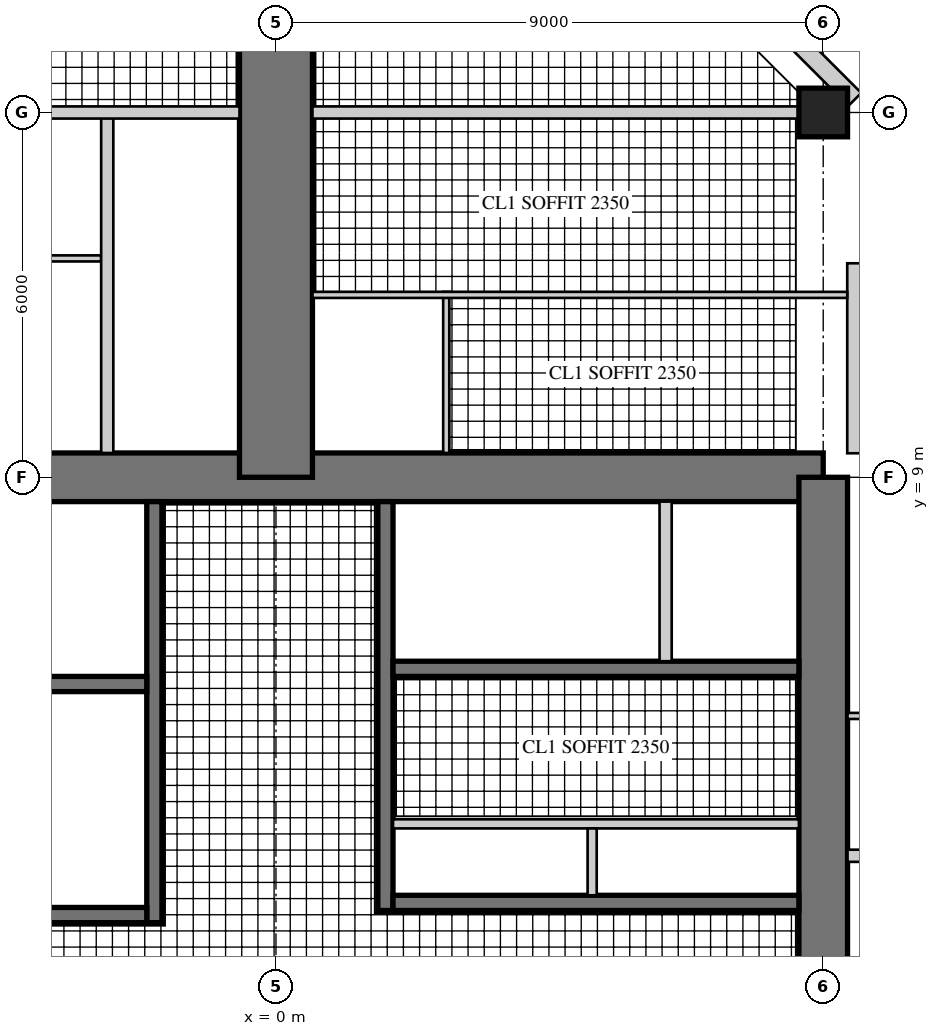
"""IFC4 building model, lengths in metres.
Left out: names, types, materials, properties, quantities, classifications, styles, units other than length and angle.
Written with IfcOpenShell. Run it as: python <this file> out.ifc"""

import sys

from ifc_helpers import new_model, si_unit, direction, frame, frame_2d, origin, origin_2d, place, context, subcontext, project, spatial, rectangle, hollow_rectangle, extrude, element, fill, save


model = new_model("IFC4")
c1 = context("Model", 3, precision=1e-05, world=origin(), true_north=direction((0.0, 1.0)))
c2 = subcontext(c1, "Body", "Model", "MODEL_VIEW")
j1 = project(units=[si_unit("LENGTHUNIT", "METRE"), si_unit("PLANEANGLEUNIT", "RADIAN")], contexts=[c1])
p1 = place(None, origin())
s1 = spatial("IfcSite", under=j1, at=p1, CompositionType="ELEMENT")
p2 = place(p1, origin())
s2 = spatial("IfcBuilding", under=s1, at=p2, CompositionType="ELEMENT")
p3 = place(p2, frame((0.0, 0.0, 235.7)))
s3 = spatial("IfcBuildingStorey", under=s2, at=p3, CompositionType="ELEMENT", Elevation=235.7)
p4 = place(p3, frame((9.0, 9.0, 0.0), z_axis=(0.0, 0.0, 1.0), x_axis=(-1.0, 0.0, 0.0)))
e1 = element("IfcWall", 1, at=p4, inside=s3, PredefinedType="SHEAR", context=c2, shape_type="SweptSolid", body=[
    extrude(rectangle(XDim=18.0, YDim=0.8, at=frame_2d((9.0, 0.0))), origin(), (0.0, 0.0, 1.0), 3.4),
])
p5 = place(p4, frame((9.8, 0.0, 0.0)))
e2 = element("IfcOpeningElement", 2, at=p5, cuts=e1, PredefinedType="OPENING", context=c2, shape_type="SweptSolid", body=[
    extrude(rectangle(XDim=1.0, YDim=2.4, at=frame_2d((0.5, 1.2))), frame((0.0, 0.41, 0.0), z_axis=(0.0, -1.0, 0.0), x_axis=(1.0, 0.0, 0.0)), (0.0, 0.0, 1.0), 0.82),
])
p6 = place(p3, frame((9.0, -9.0, 0.0), z_axis=(0.0, 0.0, 1.0), x_axis=(0.0, 1.0, 0.0)))
e3 = element("IfcWall", 3, at=p6, inside=s3, PredefinedType="SHEAR", context=c2, shape_type="SweptSolid", body=[
    extrude(rectangle(XDim=18.0, YDim=0.8, at=frame_2d((9.0, 0.0))), origin(), (0.0, 0.0, 1.0), 3.4),
])
p7 = place(p6, frame((9.8, 0.0, 0.0)))
e4 = element("IfcOpeningElement", 4, at=p7, cuts=e3, PredefinedType="OPENING", context=c2, shape_type="SweptSolid", body=[
    extrude(rectangle(XDim=1.0, YDim=2.4, at=frame_2d((0.5, 1.2))), frame((0.0, 0.41, 0.0), z_axis=(0.0, -1.0, 0.0), x_axis=(1.0, 0.0, 0.0)), (0.0, 0.0, 1.0), 0.82),
])
p8 = place(p3, frame((1.8, 1.875, 0.0), z_axis=(0.0, 0.0, 1.0), x_axis=(0.0, 1.0, 0.0)))
e5 = element("IfcWall", 5, at=p8, inside=s3, PredefinedType="SHEAR", context=c2, shape_type="SweptSolid", body=[
    extrude(rectangle(XDim=6.725, YDim=0.25, at=frame_2d((3.363, 0.0))), origin(), (0.0, 0.0, 1.0), 3.4),
])
p9 = place(p8, frame((1.875, 0.0, 0.0)))
e6 = element("IfcOpeningElement", 6, at=p9, cuts=e5, PredefinedType="OPENING", context=c2, shape_type="SweptSolid", body=[
    extrude(rectangle(XDim=1.6, YDim=2.4, at=frame_2d((0.8, 1.2))), frame((0.0, 0.135, 0.0), z_axis=(0.0, -1.0, 0.0), x_axis=(1.0, 0.0, 0.0)), (0.0, 0.0, 1.0), 0.27),
])
p10 = place(p3, frame((1.925, 2.0, 0.0), z_axis=(0.0, 0.0, 1.0), x_axis=(1.0, 0.0, 0.0)))
e7 = element("IfcWall", 7, at=p10, inside=s3, PredefinedType="SHEAR", context=c2, shape_type="SweptSolid", body=[
    extrude(rectangle(XDim=6.675, YDim=0.25, at=frame_2d((3.337, 0.0))), origin(), (0.0, 0.0, 1.0), 3.4),
])
p11 = place(p3, frame((1.925, 5.85, 0.0), z_axis=(0.0, 0.0, 1.0), x_axis=(1.0, 0.0, 0.0)))
e8 = element("IfcWall", 8, at=p11, inside=s3, PredefinedType="SHEAR", context=c2, shape_type="SweptSolid", body=[
    extrude(rectangle(XDim=6.675, YDim=0.25, at=frame_2d((3.337, 0.0))), origin(), (0.0, 0.0, 1.0), 3.4),
])
p12 = place(p11, frame((0.546, 0.0, 0.0)))
e9 = element("IfcOpeningElement", 9, at=p12, cuts=e8, PredefinedType="OPENING", context=c2, shape_type="SweptSolid", body=[
    extrude(rectangle(XDim=1.0, YDim=2.1, at=frame_2d((0.5, 1.05))), frame((0.0, 0.135, 0.0), z_axis=(0.0, -1.0, 0.0), x_axis=(1.0, 0.0, 0.0)), (0.0, 0.0, 1.0), 0.27),
])
p13 = place(p11, frame((5.129, 0.0, 0.0)))
e10 = element("IfcOpeningElement", 10, at=p13, cuts=e8, PredefinedType="OPENING", context=c2, shape_type="SweptSolid", body=[
    extrude(rectangle(XDim=1.0, YDim=2.1, at=frame_2d((0.5, 1.05))), frame((0.0, 0.135, 0.0), z_axis=(0.0, -1.0, 0.0), x_axis=(1.0, 0.0, 0.0)), (0.0, 0.0, 1.0), 0.27),
])
p14 = place(p3, frame((1.925, 3.3, 0.0), z_axis=(0.0, 0.0, 1.0), x_axis=(1.0, 0.0, 0.0)))
e11 = element("IfcWall", 11, at=p14, inside=s3, PredefinedType="PARTITIONING", context=c2, shape_type="SweptSolid", body=[
    extrude(rectangle(XDim=6.675, YDim=0.15, at=frame_2d((3.337, 0.0))), origin(), (0.0, 0.0, 1.0), 3.4),
])
p15 = place(p14, frame((0.075, 0.0, 0.0)))
e12 = element("IfcOpeningElement", 12, at=p15, cuts=e11, PredefinedType="OPENING", context=c2, shape_type="SweptSolid", body=[
    extrude(rectangle(XDim=0.8, YDim=2.1, at=frame_2d((0.4, 1.05))), frame((0.0, 0.085, 0.0), z_axis=(0.0, -1.0, 0.0), x_axis=(1.0, 0.0, 0.0)), (0.0, 0.0, 1.0), 0.17),
])
p16 = place(p14, frame((3.675, 0.0, 0.0)))
e13 = element("IfcOpeningElement", 13, at=p16, cuts=e11, PredefinedType="OPENING", context=c2, shape_type="SweptSolid", body=[
    extrude(rectangle(XDim=0.8, YDim=2.1, at=frame_2d((0.4, 1.05))), frame((0.0, 0.085, 0.0), z_axis=(0.0, -1.0, 0.0), x_axis=(1.0, 0.0, 0.0)), (0.0, 0.0, 1.0), 0.17),
])
p17 = place(p3, frame((5.2, 2.125, 0.0), z_axis=(0.0, 0.0, 1.0), x_axis=(0.0, 1.0, 0.0)))
e14 = element("IfcWall", 14, at=p17, inside=s3, PredefinedType="PARTITIONING", context=c2, shape_type="SweptSolid", body=[
    extrude(rectangle(XDim=1.1, YDim=0.15, at=frame_2d((0.55, 0.0))), origin(), (0.0, 0.0, 1.0), 3.4),
])
p18 = place(p3, frame((6.408, 5.975, 0.0), z_axis=(0.0, 0.0, 1.0), x_axis=(0.0, 1.0, 0.0)))
e15 = element("IfcWall", 15, at=p18, inside=s3, PredefinedType="PARTITIONING", context=c2, shape_type="SweptSolid", body=[
    extrude(rectangle(XDim=2.625, YDim=0.2, at=frame_2d((1.312, 0.0))), origin(), (0.0, 0.0, 1.0), 3.4),
])
p19 = place(p3, frame((-2.0, 1.675, 0.0), z_axis=(0.0, 0.0, 1.0), x_axis=(0.0, 1.0, 0.0)))
e16 = element("IfcWall", 16, at=p19, inside=s3, PredefinedType="SHEAR", context=c2, shape_type="SweptSolid", body=[
    extrude(rectangle(XDim=6.925, YDim=0.25, at=frame_2d((3.462, 0.0))), origin(), (0.0, 0.0, 1.0), 3.4),
])
p20 = place(p19, frame((0.725, 0.0, 0.0)))
e17 = element("IfcOpeningElement", 17, at=p20, cuts=e16, PredefinedType="OPENING", context=c2, shape_type="SweptSolid", body=[
    extrude(rectangle(XDim=1.0, YDim=2.1, at=frame_2d((0.5, 1.05))), frame((0.0, 0.135, 0.0), z_axis=(0.0, -1.0, 0.0), x_axis=(1.0, 0.0, 0.0)), (0.0, 0.0, 1.0), 0.27),
])
p21 = place(p3, frame((-2.125, 1.8, 0.0), z_axis=(0.0, 0.0, 1.0), x_axis=(-1.0, 0.0, 0.0)))
e18 = element("IfcWall", 18, at=p21, inside=s3, PredefinedType="SHEAR", context=c2, shape_type="SweptSolid", body=[
    extrude(rectangle(XDim=6.475, YDim=0.25, at=frame_2d((3.238, 0.0))), origin(), (0.0, 0.0, 1.0), 3.4),
])
p22 = place(p3, frame((-2.125, 5.6, 0.0), z_axis=(0.0, 0.0, 1.0), x_axis=(-1.0, 0.0, 0.0)))
e19 = element("IfcWall", 19, at=p22, inside=s3, PredefinedType="SHEAR", context=c2, shape_type="SweptSolid", body=[
    extrude(rectangle(XDim=6.475, YDim=0.25, at=frame_2d((3.238, 0.0))), origin(), (0.0, 0.0, 1.0), 3.4),
])
p23 = place(p22, frame((0.175, 0.0, 0.0)))
e20 = element("IfcOpeningElement", 20, at=p23, cuts=e19, PredefinedType="OPENING", context=c2, shape_type="SweptSolid", body=[
    extrude(rectangle(XDim=1.0, YDim=2.1, at=frame_2d((0.5, 1.05))), frame((0.0, 0.135, 0.0), z_axis=(0.0, -1.0, 0.0), x_axis=(1.0, 0.0, 0.0)), (0.0, 0.0, 1.0), 0.27),
])
p24 = place(p3, frame((0.0, 9.0, 0.0), z_axis=(0.0, 0.0, 1.0), x_axis=(0.0, 1.0, 0.0)))
e21 = element("IfcWall", 21, at=p24, inside=s3, PredefinedType="SHEAR", context=c2, shape_type="SweptSolid", body=[
    extrude(rectangle(XDim=9.0, YDim=1.2, at=frame_2d((4.5, 0.0))), origin(), (0.0, 0.0, 1.0), 3.4),
])
p25 = place(p24, frame((3.8, 0.0, 0.0)))
e22 = element("IfcOpeningElement", 22, at=p25, cuts=e21, PredefinedType="OPENING", context=c2, shape_type="SweptSolid", body=[
    extrude(rectangle(XDim=1.0, YDim=2.15, at=frame_2d((0.5, 1.075))), frame((0.0, 0.61, 0.0), z_axis=(0.0, -1.0, 0.0), x_axis=(1.0, 0.0, 0.0)), (0.0, 0.0, 1.0), 1.22),
])
p26 = place(p24, frame((7.0, 0.0, 0.0)))
e23 = element("IfcOpeningElement", 23, at=p26, cuts=e21, PredefinedType="OPENING", context=c2, shape_type="SweptSolid", body=[
    extrude(rectangle(XDim=1.0, YDim=2.2, at=frame_2d((0.5, 1.1))), frame((0.0, 0.61, 0.0), z_axis=(0.0, -1.0, 0.0), x_axis=(1.0, 0.0, 0.0)), (0.0, 0.0, 1.0), 1.22),
])
p27 = place(p3, frame((9.0, 15.0, 0.0), z_axis=(0.0, 0.0, 1.0), x_axis=(1.0, 0.0, 0.0)))
e24 = element("IfcColumn", 24, at=p27, inside=s3, PredefinedType="COLUMN", context=c2, shape_type="SweptSolid", body=[
    extrude(rectangle(XDim=0.8, YDim=0.8, at=origin_2d()), origin(), (0.0, 0.0, 1.0), 3.4),
])
p28 = place(p3, frame((9.52, 9.395, 0.0), z_axis=(0.0, 0.0, 1.0), x_axis=(0.0, 1.0, 0.0)))
e25 = element("IfcWall", 25, at=p28, inside=s3, PredefinedType="SOLIDWALL", context=c2, shape_type="SweptSolid", body=[
    extrude(rectangle(XDim=3.125, YDim=0.25, at=frame_2d((1.562, 0.0))), origin(), (0.0, 0.0, 1.0), 3.22),
])
p29 = place(p28, frame((0.6, 0.0, 0.0)))
e26 = element("IfcOpeningElement", 26, at=p29, cuts=e25, PredefinedType="OPENING", context=c2, shape_type="SweptSolid", body=[
    extrude(rectangle(XDim=1.0, YDim=2.2, at=frame_2d((0.5, 1.1))), frame((0.0, 0.135, 0.0), z_axis=(0.0, -1.0, 0.0), x_axis=(1.0, 0.0, 0.0)), (0.0, 0.0, 1.0), 0.27),
])
p30 = place(p3, frame((9.52, 15.215, 0.0), z_axis=(0.0, 0.0, 1.0), x_axis=(-0.707081278264, 0.707132283189, 0.0)))
e27 = element("IfcWall", 27, at=p30, inside=s3, PredefinedType="SOLIDWALL", context=c2, shape_type="SweptSolid", body=[
    extrude(rectangle(XDim=4.787, YDim=0.3, at=frame_2d((2.393, 0.0))), origin(), (0.0, 0.0, 1.0), 3.22),
])
p31 = place(p30, frame((1.943, 0.0, 0.3)))
e28 = element("IfcOpeningElement", 28, at=p31, cuts=e27, PredefinedType="OPENING", context=c2, shape_type="SweptSolid", body=[
    extrude(rectangle(XDim=0.9, YDim=2.4, at=frame_2d((0.45, 1.2))), frame((0.0, 0.16, 0.0), z_axis=(0.0, -1.0, 0.0), x_axis=(1.0, 0.0, 0.0)), (0.0, 0.0, 1.0), 0.32),
])
p32 = place(p3, frame((-2.875, 12.6, 0.0), z_axis=(0.0, 0.0, 1.0), x_axis=(-1.0, 0.0, 0.0)))
e29 = element("IfcWall", 29, at=p32, inside=s3, PredefinedType="PARTITIONING", context=c2, shape_type="SweptSolid", body=[
    extrude(rectangle(XDim=6.605, YDim=0.1, at=frame_2d((3.302, 0.0))), origin(), (0.0, 0.0, 1.0), 3.22),
])
p33 = place(p32, frame((0.55, 0.0, 0.0)))
e30 = element("IfcOpeningElement", 30, at=p33, cuts=e29, PredefinedType="OPENING", context=c2, shape_type="SweptSolid", body=[
    extrude(rectangle(XDim=0.9, YDim=2.1, at=frame_2d((0.45, 1.05))), frame((0.0, 0.06, 0.0), z_axis=(0.0, -1.0, 0.0), x_axis=(1.0, 0.0, 0.0)), (0.0, 0.0, 1.0), 0.12),
])
p34 = place(p32, frame((2.65, 0.0, 0.0)))
e31 = element("IfcOpeningElement", 31, at=p34, cuts=e29, PredefinedType="OPENING", context=c2, shape_type="SweptSolid", body=[
    extrude(rectangle(XDim=0.9, YDim=2.1, at=frame_2d((0.45, 1.05))), frame((0.0, 0.06, 0.0), z_axis=(0.0, -1.0, 0.0), x_axis=(1.0, 0.0, 0.0)), (0.0, 0.0, 1.0), 0.12),
])
p35 = place(p3, frame((2.8, 9.4, 0.0), z_axis=(0.0, 0.0, 1.0), x_axis=(0.0, 1.0, 0.0)))
e32 = element("IfcWall", 32, at=p35, inside=s3, PredefinedType="PARTITIONING", context=c2, shape_type="SweptSolid", body=[
    extrude(rectangle(XDim=2.65, YDim=0.1, at=frame_2d((1.325, 0.0))), origin(), (0.0, 0.0, 1.0), 3.22),
])
p36 = place(p3, frame((9.395, 12.0, 0.0), z_axis=(0.0, 0.0, 1.0), x_axis=(-1.0, 0.0, 0.0)))
e33 = element("IfcWall", 33, at=p36, inside=s3, PredefinedType="PARTITIONING", context=c2, shape_type="SweptSolid", body=[
    extrude(rectangle(XDim=8.795, YDim=0.1, at=frame_2d((4.397, 0.0))), origin(), (0.0, 0.0, 1.0), 3.22),
])
p37 = place(p36, frame((5.245, 0.0, 0.0)))
e34 = element("IfcOpeningElement", 34, at=p37, cuts=e33, PredefinedType="OPENING", context=c2, shape_type="SweptSolid", body=[
    extrude(rectangle(XDim=0.9, YDim=2.1, at=frame_2d((0.45, 1.05))), frame((0.0, 0.06, 0.0), z_axis=(0.0, -1.0, 0.0), x_axis=(1.0, 0.0, 0.0)), (0.0, 0.0, 1.0), 0.12),
])
p38 = place(p36, frame((7.345, 0.0, 0.0)))
e35 = element("IfcOpeningElement", 35, at=p38, cuts=e33, PredefinedType="OPENING", context=c2, shape_type="SweptSolid", body=[
    extrude(rectangle(XDim=0.9, YDim=2.1, at=frame_2d((0.45, 1.05))), frame((0.0, 0.06, 0.0), z_axis=(0.0, -1.0, 0.0), x_axis=(1.0, 0.0, 0.0)), (0.0, 0.0, 1.0), 0.12),
])
p39 = place(p3, frame((-2.775, 9.4, 0.0), z_axis=(0.0, 0.0, 1.0), x_axis=(0.0, 1.0, 0.0)))
e36 = element("IfcWall", 36, at=p39, inside=s3, PredefinedType="SOLIDWALL", context=c2, shape_type="SweptSolid", body=[
    extrude(rectangle(XDim=5.6, YDim=0.2, at=frame_2d((2.8, 0.0))), origin(), (0.0, 0.0, 1.0), 3.22),
])
p40 = place(p39, frame((3.75, 0.0, 0.0)))
e37 = element("IfcOpeningElement", 37, at=p40, cuts=e36, PredefinedType="OPENING", context=c2, shape_type="SweptSolid", body=[
    extrude(rectangle(XDim=1.0, YDim=2.15, at=frame_2d((0.5, 1.075))), frame((0.0, 0.11, 0.0), z_axis=(0.0, -1.0, 0.0), x_axis=(1.0, 0.0, 0.0)), (0.0, 0.0, 1.0), 0.22),
])
p41 = place(p3, frame((8.6, 15.0, 0.0), z_axis=(0.0, 0.0, 1.0), x_axis=(-1.0, 0.0, 0.0)))
e38 = element("IfcWall", 38, at=p41, inside=s3, PredefinedType="SOLIDWALL", context=c2, shape_type="SweptSolid", body=[
    extrude(rectangle(XDim=8.0, YDim=0.2, at=frame_2d((4.0, 0.0))), origin(), (0.0, 0.0, 1.0), 2.52),
])
p42 = place(p3, frame((-0.6, 15.0, 0.0), z_axis=(0.0, 0.0, 1.0), x_axis=(-1.0, 0.0, 0.0)))
e39 = element("IfcWall", 39, at=p42, inside=s3, PredefinedType="SOLIDWALL", context=c2, shape_type="SweptSolid", body=[
    extrude(rectangle(XDim=8.0, YDim=0.2, at=frame_2d((4.0, 0.0))), origin(), (0.0, 0.0, 1.0), 2.52),
])
p43 = place(p42, frame((0.35, 0.0, 0.0)))
e40 = element("IfcOpeningElement", 40, at=p43, cuts=e39, PredefinedType="OPENING", context=c2, shape_type="SweptSolid", body=[
    extrude(rectangle(XDim=1.0, YDim=2.2, at=frame_2d((0.5, 1.1))), frame((0.0, 0.11, 0.0), z_axis=(0.0, -1.0, 0.0), x_axis=(1.0, 0.0, 0.0)), (0.0, 0.0, 1.0), 0.22),
])
p44 = place(p3, frame((9.4, 5.075, 0.0), z_axis=(0.0, 0.0, 1.0), x_axis=(1.0, 0.0, 0.0)))
e41 = element("IfcWall", 41, at=p44, inside=s3, PredefinedType="PARTITIONING", context=c2, shape_type="SweptSolid", body=[
    extrude(rectangle(XDim=3.25, YDim=0.1, at=frame_2d((1.625, 0.0))), origin(), (0.0, 0.0, 1.0), 3.22),
])
p45 = place(p3, frame((9.4, 2.775, 0.0), z_axis=(0.0, 0.0, 1.0), x_axis=(1.0, 0.0, 0.0)))
e42 = element("IfcWall", 42, at=p45, inside=s3, PredefinedType="SOLIDWALL", context=c2, shape_type="SweptSolid", body=[
    extrude(rectangle(XDim=5.6, YDim=0.2, at=frame_2d((2.8, 0.0))), origin(), (0.0, 0.0, 1.0), 3.22),
])
p46 = place(p45, frame((3.75, 0.0, 0.0)))
e43 = element("IfcOpeningElement", 43, at=p46, cuts=e42, PredefinedType="OPENING", context=c2, shape_type="SweptSolid", body=[
    extrude(rectangle(XDim=1.0, YDim=2.15, at=frame_2d((0.5, 1.075))), frame((0.0, 0.11, 0.0), z_axis=(0.0, -1.0, 0.0), x_axis=(1.0, 0.0, 0.0)), (0.0, 0.0, 1.0), 0.22),
])
p47 = place(p29, origin())
e44 = element("IfcDoor", 44, at=p47, inside=s3, OperationType="SINGLE_SWING_RIGHT", PredefinedType="DOOR", context=c2, shape_type="SweptSolid", body=[
    extrude(hollow_rectangle(XDim=1.0, YDim=2.2, WallThickness=0.06, at=frame_2d((0.5, 1.1))), frame((0.0, 0.025, 0.0), z_axis=(0.0, -1.0, 0.0), x_axis=(1.0, 0.0, 0.0)), (0.0, 0.0, 1.0), 0.05),
    extrude(rectangle(XDim=0.879, YDim=2.079, at=frame_2d((0.5, 1.1))), frame((0.0, 0.025, 0.0), z_axis=(0.0, -1.0, 0.0), x_axis=(1.0, 0.0, 0.0)), (0.0, 0.0, 1.0), 0.05),
])
fill(e26, e44)
p48 = place(p33, origin())
e45 = element("IfcDoor", 45, at=p48, inside=s3, OperationType="SINGLE_SWING_LEFT", PredefinedType="DOOR", context=c2, shape_type="SweptSolid", body=[
    extrude(rectangle(XDim=0.9, YDim=2.1, at=frame_2d((0.45, 1.05))), frame((0.0, 0.025, 0.0), z_axis=(0.0, -1.0, 0.0), x_axis=(1.0, 0.0, 0.0)), (0.0, 0.0, 1.0), 0.05),
])
fill(e30, e45)
p49 = place(p37, origin())
e46 = element("IfcDoor", 46, at=p49, inside=s3, OperationType="SINGLE_SWING_RIGHT", PredefinedType="DOOR", context=c2, shape_type="SweptSolid", body=[
    extrude(rectangle(XDim=0.9, YDim=2.1, at=frame_2d((0.45, 1.05))), frame((0.0, 0.025, 0.0), z_axis=(0.0, -1.0, 0.0), x_axis=(1.0, 0.0, 0.0)), (0.0, 0.0, 1.0), 0.05),
])
fill(e34, e46)
p50 = place(p38, origin())
e47 = element("IfcDoor", 47, at=p50, inside=s3, OperationType="SINGLE_SWING_RIGHT", PredefinedType="DOOR", context=c2, shape_type="SweptSolid", body=[
    extrude(rectangle(XDim=0.9, YDim=2.1, at=frame_2d((0.45, 1.05))), frame((0.0, 0.025, 0.0), z_axis=(0.0, -1.0, 0.0), x_axis=(1.0, 0.0, 0.0)), (0.0, 0.0, 1.0), 0.05),
])
fill(e35, e47)
p51 = place(p40, origin())
e48 = element("IfcDoor", 48, at=p51, inside=s3, OperationType="SINGLE_SWING_LEFT", PredefinedType="DOOR", context=c2, shape_type="SweptSolid", body=[
    extrude(rectangle(XDim=1.0, YDim=2.15, at=frame_2d((0.5, 1.075))), frame((0.0, 0.025, 0.0), z_axis=(0.0, -1.0, 0.0), x_axis=(1.0, 0.0, 0.0)), (0.0, 0.0, 1.0), 0.05),
])
fill(e37, e48)
p52 = place(p43, frame((1.0, 0.0, 0.0), z_axis=(0.0, 0.0, 1.0), x_axis=(-1.0, 0.0, 0.0)))
e49 = element("IfcDoor", 49, at=p52, inside=s3, OperationType="SINGLE_SWING_RIGHT", PredefinedType="DOOR", context=c2, shape_type="SweptSolid", body=[
    extrude(rectangle(XDim=1.0, YDim=2.2, at=frame_2d((0.5, 1.1))), frame((0.0, 0.025, 0.0), z_axis=(0.0, -1.0, 0.0), x_axis=(1.0, 0.0, 0.0)), (0.0, 0.0, 1.0), 0.05),
])
fill(e40, e49)
p53 = place(p25, frame((1.0, 0.0, 0.0), z_axis=(0.0, 0.0, 1.0), x_axis=(-1.0, 0.0, 0.0)))
e50 = element("IfcDoor", 50, at=p53, inside=s3, OperationType="SINGLE_SWING_RIGHT", PredefinedType="DOOR", context=c2, shape_type="SweptSolid", body=[
    extrude(rectangle(XDim=1.0, YDim=2.15, at=frame_2d((0.5, 1.075))), frame((0.0, 0.025, 0.0), z_axis=(0.0, -1.0, 0.0), x_axis=(1.0, 0.0, 0.0)), (0.0, 0.0, 1.0), 0.05),
])
fill(e22, e50)
p54 = place(p5, origin())
e51 = element("IfcDoor", 51, at=p54, inside=s3, OperationType="SINGLE_SWING_RIGHT", PredefinedType="DOOR", context=c2, shape_type="SweptSolid", body=[
    extrude(rectangle(XDim=1.0, YDim=2.4, at=frame_2d((0.5, 1.2))), frame((0.0, 0.055, 0.0), z_axis=(0.0, -1.0, 0.0), x_axis=(1.0, 0.0, 0.0)), (0.0, 0.0, 1.0), 0.05),
])
fill(e2, e51)
p55 = place(p7, origin())
e52 = element("IfcDoor", 52, at=p55, inside=s3, OperationType="SINGLE_SWING_RIGHT", PredefinedType="DOOR", context=c2, shape_type="SweptSolid", body=[
    extrude(rectangle(XDim=1.0, YDim=2.4, at=frame_2d((0.5, 1.2))), frame((0.0, 0.055, 0.0), z_axis=(0.0, -1.0, 0.0), x_axis=(1.0, 0.0, 0.0)), (0.0, 0.0, 1.0), 0.05),
])
fill(e4, e52)
p56 = place(p9, frame((1.6, 0.0, 0.0), z_axis=(0.0, 0.0, 1.0), x_axis=(-1.0, 0.0, 0.0)))
e53 = element("IfcDoor", 53, at=p56, inside=s3, OperationType="DOUBLE_DOOR_SINGLE_SWING", PredefinedType="DOOR", context=c2, shape_type="SweptSolid", body=[
    extrude(rectangle(XDim=1.6, YDim=2.4, at=frame_2d((0.8, 1.2))), frame((0.0, 0.025, 0.0), z_axis=(0.0, -1.0, 0.0), x_axis=(1.0, 0.0, 0.0)), (0.0, 0.0, 1.0), 0.05),
])
fill(e6, e53)
p57 = place(p15, frame((0.8, 0.0, 0.0), z_axis=(0.0, 0.0, 1.0), x_axis=(-1.0, 0.0, 0.0)))
e54 = element("IfcDoor", 54, at=p57, inside=s3, OperationType="SINGLE_SWING_RIGHT", PredefinedType="DOOR", context=c2, shape_type="SweptSolid", body=[
    extrude(rectangle(XDim=0.8, YDim=2.1, at=frame_2d((0.4, 1.05))), frame((0.0, 0.025, 0.0), z_axis=(0.0, -1.0, 0.0), x_axis=(1.0, 0.0, 0.0)), (0.0, 0.0, 1.0), 0.05),
])
fill(e12, e54)
p58 = place(p16, frame((0.8, 0.0, 0.0), z_axis=(0.0, 0.0, 1.0), x_axis=(-1.0, 0.0, 0.0)))
e55 = element("IfcDoor", 55, at=p58, inside=s3, OperationType="SINGLE_SWING_RIGHT", PredefinedType="DOOR", context=c2, shape_type="SweptSolid", body=[
    extrude(rectangle(XDim=0.8, YDim=2.1, at=frame_2d((0.4, 1.05))), frame((0.0, 0.025, 0.0), z_axis=(0.0, -1.0, 0.0), x_axis=(1.0, 0.0, 0.0)), (0.0, 0.0, 1.0), 0.05),
])
fill(e13, e55)
p59 = place(p20, origin())
e56 = element("IfcDoor", 56, at=p59, inside=s3, OperationType="SINGLE_SWING_LEFT", PredefinedType="DOOR", context=c2, shape_type="SweptSolid", body=[
    extrude(rectangle(XDim=1.0, YDim=2.1, at=frame_2d((0.5, 1.05))), frame((0.0, 0.025, 0.0), z_axis=(0.0, -1.0, 0.0), x_axis=(1.0, 0.0, 0.0)), (0.0, 0.0, 1.0), 0.05),
])
fill(e17, e56)
p60 = place(p23, frame((1.0, 0.0, 0.0), z_axis=(0.0, 0.0, 1.0), x_axis=(-1.0, 0.0, 0.0)))
e57 = element("IfcDoor", 57, at=p60, inside=s3, OperationType="SINGLE_SWING_RIGHT", PredefinedType="DOOR", context=c2, shape_type="SweptSolid", body=[
    extrude(rectangle(XDim=1.0, YDim=2.1, at=frame_2d((0.5, 1.05))), frame((0.0, 0.025, 0.0), z_axis=(0.0, -1.0, 0.0), x_axis=(1.0, 0.0, 0.0)), (0.0, 0.0, 1.0), 0.05),
])
fill(e20, e57)
p61 = place(p12, origin())
e58 = element("IfcDoor", 58, at=p61, inside=s3, OperationType="SINGLE_SWING_LEFT", PredefinedType="DOOR", context=c2, shape_type="SweptSolid", body=[
    extrude(rectangle(XDim=1.0, YDim=2.1, at=frame_2d((0.5, 1.05))), frame((0.0, 0.025, 0.0), z_axis=(0.0, -1.0, 0.0), x_axis=(1.0, 0.0, 0.0)), (0.0, 0.0, 1.0), 0.05),
])
fill(e9, e58)
p62 = place(p13, origin())
e59 = element("IfcDoor", 59, at=p62, inside=s3, OperationType="SINGLE_SWING_RIGHT", PredefinedType="DOOR", context=c2, shape_type="SweptSolid", body=[
    extrude(rectangle(XDim=1.0, YDim=2.1, at=frame_2d((0.5, 1.05))), frame((0.0, 0.025, 0.0), z_axis=(0.0, -1.0, 0.0), x_axis=(1.0, 0.0, 0.0)), (0.0, 0.0, 1.0), 0.05),
])
fill(e10, e59)
save(model, sys.argv[1])
